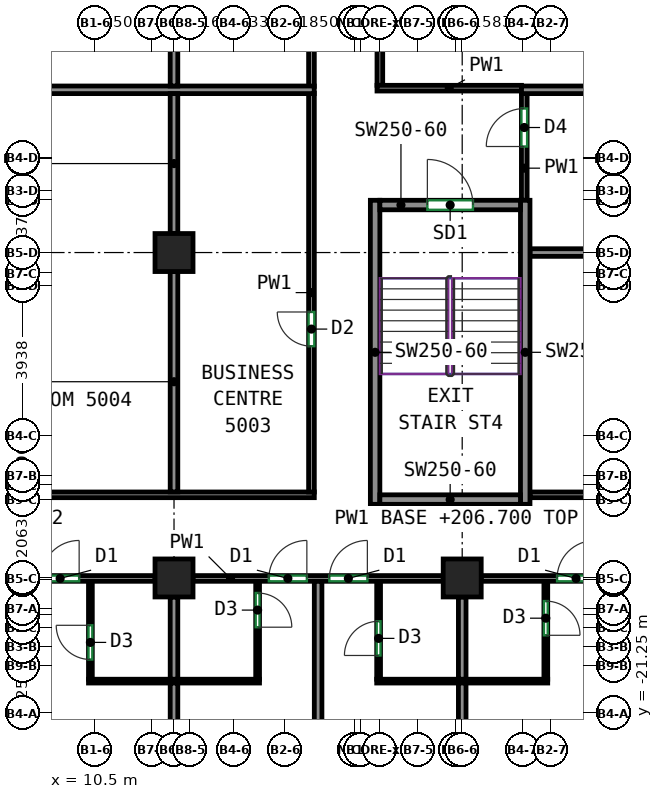
"""IFC4 building model, lengths in metres.
Left out: names, types, materials, properties, quantities, classifications, styles, units other than length and angle.
Written with IfcOpenShell. Run it as: python <this file> out.ifc"""

import sys

from ifc_helpers import new_model, si_unit, direction, frame, frame_2d, origin, origin_2d, place, context, subcontext, project, spatial, rectangle, extrude, source, transform, mapped, element, fill, save


model = new_model("IFC4")
c1 = context("Model", 3, precision=1e-05, world=origin(), true_north=direction((0.0, 1.0)))
c2 = subcontext(c1, "Body", "Model", "MODEL_VIEW")
j1 = project(units=[si_unit("LENGTHUNIT", "METRE"), si_unit("PLANEANGLEUNIT", "RADIAN")], contexts=[c1])
p1 = place(None, origin())
s1 = spatial("IfcSite", under=j1, at=p1, CompositionType="ELEMENT")
p2 = place(p1, origin())
s2 = spatial("IfcBuilding", under=s1, at=p2, CompositionType="ELEMENT")
p3 = place(p2, frame((0.0, 0.0, 206.7)))
s3 = spatial("IfcBuildingStorey", under=s2, at=p3, CompositionType="ELEMENT", Elevation=206.7)
m1 = source(origin(), c2, "Body", "SweptSolid", [
    extrude(rectangle(XDim=1.0, YDim=1.0, at=origin_2d()), origin(), (0.0, 0.0, 1.0), 3.12),
])
for number, where, z_axis, x_axis in (
    (1, (12.583, -17.688, 0.0), (0.0, 0.0, 1.0), (1.0, 0.0, 0.0)),
    (2, (12.583, -9.125, 0.0), (0.0, 0.0, 1.0), (1.0, 0.0, 0.0)),
    (3, (20.167, -17.688, 0.0), (0.0, 0.0, 1.0), (1.0, 0.0, 0.0)),
):
    element("IfcColumn", number, at=place(p3, frame(where, z_axis=z_axis, x_axis=x_axis)), inside=s3, PredefinedType="COLUMN", context=c2, shape_type="MappedRepresentation", body=[
        mapped(m1, transform((0.0, 0.0, 0.0))),
    ])
m2 = source(origin(), c2, "Body", "SweptSolid", [
    extrude(rectangle(XDim=8.0, YDim=0.25, at=frame_2d((4.0, 0.0))), origin(), (0.0, 0.0, 1.0), 3.12),
])
for number, where, z_axis, x_axis in (
    (4, (17.875, -15.75, 0.0), (0.0, 0.0, 1.0), (0.0, 1.0, 0.0)),
    (5, (21.825, -15.75, 0.0), (0.0, 0.0, 1.0), (0.0, 1.0, 0.0)),
):
    element("IfcWall", number, at=place(p3, frame(where, z_axis=z_axis, x_axis=x_axis)), inside=s3, PredefinedType="SHEAR", context=c2, shape_type="MappedRepresentation", body=[
        mapped(m2, transform((0.0, 0.0, 0.0))),
    ])
m3 = source(origin(), c2, "Body", "SweptSolid", [
    extrude(rectangle(XDim=3.7, YDim=0.25, at=frame_2d((1.85, 0.0))), origin(), (0.0, 0.0, 1.0), 3.12),
])
p4 = place(p3, frame((18.0, -15.625, 0.0), z_axis=(0.0, 0.0, 1.0), x_axis=(1.0, 0.0, 0.0)))
e6 = element("IfcWall", 6, at=p4, inside=s3, PredefinedType="SHEAR", context=c2, shape_type="MappedRepresentation", body=[
    mapped(m3, transform((0.0, 0.0, 0.0))),
])
p5 = place(p3, frame((18.0, -7.875, 0.0), z_axis=(0.0, 0.0, 1.0), x_axis=(1.0, 0.0, 0.0)))
e7 = element("IfcWall", 7, at=p5, inside=s3, PredefinedType="SHEAR", context=c2, shape_type="MappedRepresentation", body=[
    mapped(m3, transform((0.0, 0.0, 0.0))),
])
p6 = place(p5, frame((1.25, 0.0, 0.0)))
e8 = element("IfcOpeningElement", 8, at=p6, cuts=e7, PredefinedType="OPENING", context=c2, shape_type="SweptSolid", body=[
    extrude(rectangle(XDim=1.2, YDim=2.1, at=frame_2d((0.6, 1.05))), frame((0.0, 0.135, 0.0), z_axis=(0.0, -1.0, 0.0), x_axis=(1.0, 0.0, 0.0)), (0.0, 0.0, 1.0), 0.27),
])
p7 = place(p3, frame((5.5, -17.7, 0.0), z_axis=(0.0, 0.0, 1.0), x_axis=(1.0, 0.0, 0.0)))
e9 = element("IfcWall", 9, at=p7, inside=s3, PredefinedType="PARTITIONING", context=c2, shape_type="SweptSolid", body=[
    extrude(rectangle(XDim=6.583, YDim=0.15, at=frame_2d((3.292, 0.0))), origin(), (0.0, 0.0, 1.0), 3.12),
])
p8 = place(p7, frame((2.101, 0.0, 0.0)))
e10 = element("IfcOpeningElement", 10, at=p8, cuts=e9, PredefinedType="OPENING", context=c2, shape_type="SweptSolid", body=[
    extrude(rectangle(XDim=1.0, YDim=2.1, at=frame_2d((0.5, 1.05))), frame((0.0, 0.085, 0.0), z_axis=(0.0, -1.0, 0.0), x_axis=(1.0, 0.0, 0.0)), (0.0, 0.0, 1.0), 0.17),
])
p9 = place(p7, frame((3.587, 0.0, 0.0)))
e11 = element("IfcOpeningElement", 11, at=p9, cuts=e9, PredefinedType="OPENING", context=c2, shape_type="SweptSolid", body=[
    extrude(rectangle(XDim=1.0, YDim=2.1, at=frame_2d((0.5, 1.05))), frame((0.0, 0.085, 0.0), z_axis=(0.0, -1.0, 0.0), x_axis=(1.0, 0.0, 0.0)), (0.0, 0.0, 1.0), 0.17),
])
p10 = place(p3, frame((13.083, -17.7, 0.0), z_axis=(0.0, 0.0, 1.0), x_axis=(1.0, 0.0, 0.0)))
e12 = element("IfcWall", 12, at=p10, inside=s3, PredefinedType="PARTITIONING", context=c2, shape_type="SweptSolid", body=[
    extrude(rectangle(XDim=6.584, YDim=0.15, at=frame_2d((3.292, 0.0))), origin(), (0.0, 0.0, 1.0), 3.12),
])
p11 = place(p10, frame((1.996, 0.0, 0.0)))
e13 = element("IfcOpeningElement", 13, at=p11, cuts=e12, PredefinedType="OPENING", context=c2, shape_type="SweptSolid", body=[
    extrude(rectangle(XDim=1.0, YDim=2.1, at=frame_2d((0.5, 1.05))), frame((0.0, 0.085, 0.0), z_axis=(0.0, -1.0, 0.0), x_axis=(1.0, 0.0, 0.0)), (0.0, 0.0, 1.0), 0.17),
])
p12 = place(p10, frame((3.588, 0.0, 0.0)))
e14 = element("IfcOpeningElement", 14, at=p12, cuts=e12, PredefinedType="OPENING", context=c2, shape_type="SweptSolid", body=[
    extrude(rectangle(XDim=1.0, YDim=2.1, at=frame_2d((0.5, 1.05))), frame((0.0, 0.085, 0.0), z_axis=(0.0, -1.0, 0.0), x_axis=(1.0, 0.0, 0.0)), (0.0, 0.0, 1.0), 0.17),
])
p13 = place(p3, frame((20.667, -17.7, 0.0), z_axis=(0.0, 0.0, 1.0), x_axis=(1.0, 0.0, 0.0)))
e15 = element("IfcWall", 15, at=p13, inside=s3, PredefinedType="PARTITIONING", context=c2, shape_type="SweptSolid", body=[
    extrude(rectangle(XDim=7.083, YDim=0.15, at=frame_2d((3.542, 0.0))), origin(), (0.0, 0.0, 1.0), 2.52),
])
p14 = place(p13, frame((1.996, 0.0, 0.0)))
e16 = element("IfcOpeningElement", 16, at=p14, cuts=e15, PredefinedType="OPENING", context=c2, shape_type="SweptSolid", body=[
    extrude(rectangle(XDim=1.0, YDim=2.1, at=frame_2d((0.5, 1.05))), frame((0.0, 0.085, 0.0), z_axis=(0.0, -1.0, 0.0), x_axis=(1.0, 0.0, 0.0)), (0.0, 0.0, 1.0), 0.17),
])
p15 = place(p13, frame((5.782, 0.0, 0.0)))
e17 = element("IfcOpeningElement", 17, at=p15, cuts=e15, PredefinedType="OPENING", context=c2, shape_type="SweptSolid", body=[
    extrude(rectangle(XDim=1.0, YDim=2.1, at=frame_2d((0.5, 1.05))), frame((0.0, 0.085, 0.0), z_axis=(0.0, -1.0, 0.0), x_axis=(1.0, 0.0, 0.0)), (0.0, 0.0, 1.0), 0.17),
])
p16 = place(p3, frame((18.0, -4.725, 0.0), z_axis=(0.0, 0.0, 1.0), x_axis=(0.0, 1.0, 0.0)))
e18 = element("IfcWall", 18, at=p16, inside=s3, PredefinedType="PARTITIONING", context=c2, shape_type="SweptSolid", body=[
    extrude(rectangle(XDim=8.35, YDim=0.15, at=frame_2d((4.175, 0.0))), origin(), (0.0, 0.0, 1.0), 3.12),
])
p17 = place(p16, frame((1.409, 0.0, 0.0)))
e19 = element("IfcOpeningElement", 19, at=p17, cuts=e18, PredefinedType="OPENING", context=c2, shape_type="SweptSolid", body=[
    extrude(rectangle(XDim=0.9, YDim=2.1, at=frame_2d((0.45, 1.05))), frame((0.0, 0.085, 0.0), z_axis=(0.0, -1.0, 0.0), x_axis=(1.0, 0.0, 0.0)), (0.0, 0.0, 1.0), 0.17),
])
p18 = place(p3, frame((17.925, -4.8, 0.0), z_axis=(0.0, 0.0, 1.0), x_axis=(1.0, 0.0, 0.0)))
e20 = element("IfcWall", 20, at=p18, inside=s3, PredefinedType="PARTITIONING", context=c2, shape_type="SweptSolid", body=[
    extrude(rectangle(XDim=3.802, YDim=0.15, at=frame_2d((1.901, 0.0))), origin(), (0.0, 0.0, 1.0), 3.12),
])
p19 = place(p3, frame((21.8, -7.75, 0.0), z_axis=(0.0, 0.0, 1.0), x_axis=(0.0, 1.0, 0.0)))
e21 = element("IfcWall", 21, at=p19, inside=s3, PredefinedType="PARTITIONING", context=c2, shape_type="SweptSolid", body=[
    extrude(rectangle(XDim=2.817, YDim=0.15, at=frame_2d((1.408, 0.0))), origin(), (0.0, 0.0, 1.0), 3.12),
])
p20 = place(p19, frame((1.415, 0.0, 0.0)))
e22 = element("IfcOpeningElement", 22, at=p20, cuts=e21, PredefinedType="OPENING", context=c2, shape_type="SweptSolid", body=[
    extrude(rectangle(XDim=1.0, YDim=2.1, at=frame_2d((0.5, 1.05))), frame((0.0, 0.085, 0.0), z_axis=(0.0, -1.0, 0.0), x_axis=(1.0, 0.0, 0.0)), (0.0, 0.0, 1.0), 0.17),
])
p21 = place(p3, frame((21.95, -15.5, 0.0), z_axis=(0.0, 0.0, 1.0), x_axis=(1.0, 0.0, 0.0)))
e23 = element("IfcWall", 23, at=p21, inside=s3, PredefinedType="PARTITIONING", context=c2, shape_type="SweptSolid", body=[
    extrude(rectangle(XDim=5.875, YDim=0.15, at=frame_2d((2.938, 0.0))), origin(), (0.0, 0.0, 1.0), 3.12),
])
p22 = place(p21, frame((3.962, 0.0, 0.0)))
e24 = element("IfcOpeningElement", 24, at=p22, cuts=e23, PredefinedType="OPENING", context=c2, shape_type="SweptSolid", body=[
    extrude(rectangle(XDim=0.9, YDim=2.1, at=frame_2d((0.45, 1.05))), frame((0.0, 0.085, 0.0), z_axis=(0.0, -1.0, 0.0), x_axis=(1.0, 0.0, 0.0)), (0.0, 0.0, 1.0), 0.17),
])
p23 = place(p3, frame((16.2, -4.753, 0.0), z_axis=(0.0, 0.0, 1.0), x_axis=(0.0, 1.0, 0.0)))
e25 = element("IfcWall", 25, at=p23, inside=s3, PredefinedType="PARTITIONING", context=c2, shape_type="SweptSolid", body=[
    extrude(rectangle(XDim=8.378, YDim=0.15, at=frame_2d((4.189, 0.0))), origin(), (0.0, 0.0, 1.0), 3.12),
])
p24 = place(p23, frame((3.031, 0.0, 0.0)))
e26 = element("IfcOpeningElement", 26, at=p24, cuts=e25, PredefinedType="OPENING", context=c2, shape_type="SweptSolid", body=[
    extrude(rectangle(XDim=0.9, YDim=2.1, at=frame_2d((0.45, 1.05))), frame((0.0, 0.085, 0.0), z_axis=(0.0, -1.0, 0.0), x_axis=(1.0, 0.0, 0.0)), (0.0, 0.0, 1.0), 0.17),
])
p25 = place(p3, frame((-6.385, -15.5, 0.0), z_axis=(0.0, 0.0, 1.0), x_axis=(1.0, 0.0, 0.0)))
e27 = element("IfcWall", 27, at=p25, inside=s3, PredefinedType="PARTITIONING", context=c2, shape_type="SweptSolid", body=[
    extrude(rectangle(XDim=22.66, YDim=0.15, at=frame_2d((11.33, 0.0))), origin(), (0.0, 0.0, 1.0), 3.12),
])
p26 = place(p25, frame((7.266, 0.0, 0.0)))
e28 = element("IfcOpeningElement", 28, at=p26, cuts=e27, PredefinedType="OPENING", context=c2, shape_type="SweptSolid", body=[
    extrude(rectangle(XDim=0.9, YDim=2.1, at=frame_2d((0.45, 1.05))), frame((0.0, 0.085, 0.0), z_axis=(0.0, -1.0, 0.0), x_axis=(1.0, 0.0, 0.0)), (0.0, 0.0, 1.0), 0.17),
])
p27 = place(p25, frame((14.576, 0.0, 0.0)))
e29 = element("IfcOpeningElement", 29, at=p27, cuts=e27, PredefinedType="OPENING", context=c2, shape_type="SweptSolid", body=[
    extrude(rectangle(XDim=0.9, YDim=2.1, at=frame_2d((0.45, 1.05))), frame((0.0, 0.085, 0.0), z_axis=(0.0, -1.0, 0.0), x_axis=(1.0, 0.0, 0.0)), (0.0, 0.0, 1.0), 0.17),
])
p28 = place(p3, frame((16.2, -15.425, 0.0), z_axis=(0.0, 0.0, 1.0), x_axis=(0.0, 1.0, 0.0)))
e30 = element("IfcWall", 30, at=p28, inside=s3, PredefinedType="PARTITIONING", context=c2, shape_type="SweptSolid", body=[
    extrude(rectangle(XDim=10.492, YDim=0.15, at=frame_2d((5.246, 0.0))), origin(), (0.0, 0.0, 1.0), 3.12),
])
p29 = place(p28, frame((3.836, 0.0, 0.0)))
e31 = element("IfcOpeningElement", 31, at=p29, cuts=e30, PredefinedType="OPENING", context=c2, shape_type="SweptSolid", body=[
    extrude(rectangle(XDim=0.9, YDim=2.1, at=frame_2d((0.45, 1.05))), frame((0.0, 0.085, 0.0), z_axis=(0.0, -1.0, 0.0), x_axis=(1.0, 0.0, 0.0)), (0.0, 0.0, 1.0), 0.17),
])
p30 = place(p3, frame((10.383, -20.352, 0.0), z_axis=(0.0, 0.0, 1.0), x_axis=(0.0, 1.0, 0.0)))
e32 = element("IfcWall", 32, at=p30, inside=s3, PredefinedType="PARTITIONING", context=c2, shape_type="SweptSolid", body=[
    extrude(rectangle(XDim=2.575, YDim=0.1, at=frame_2d((1.288, 0.0))), origin(), (0.0, 0.0, 1.0), 3.12),
])
p31 = place(p30, frame((0.519, 0.0, 0.0)))
e33 = element("IfcOpeningElement", 33, at=p31, cuts=e32, PredefinedType="OPENING", context=c2, shape_type="SweptSolid", body=[
    extrude(rectangle(XDim=0.9, YDim=2.1, at=frame_2d((0.45, 1.05))), frame((0.0, 0.06, 0.0), z_axis=(0.0, -1.0, 0.0), x_axis=(1.0, 0.0, 0.0)), (0.0, 0.0, 1.0), 0.12),
])
p32 = place(p3, frame((10.333, -20.402, 0.0), z_axis=(0.0, 0.0, 1.0), x_axis=(1.0, 0.0, 0.0)))
e34 = element("IfcWall", 34, at=p32, inside=s3, PredefinedType="PARTITIONING", context=c2, shape_type="SweptSolid", body=[
    extrude(rectangle(XDim=4.5, YDim=0.1, at=frame_2d((2.25, 0.0))), origin(), (0.0, 0.0, 1.0), 3.12),
])
p33 = place(p3, frame((12.583, -25.425, 0.0), z_axis=(0.0, 0.0, 1.0), x_axis=(0.0, 1.0, 0.0)))
e35 = element("IfcWall", 35, at=p33, inside=s3, PredefinedType="PARTITIONING", context=c2, shape_type="SweptSolid", body=[
    extrude(rectangle(XDim=4.973, YDim=0.2, at=frame_2d((2.487, 0.0))), origin(), (0.0, 0.0, 1.0), 3.12),
])
p34 = place(p3, frame((12.583, -20.352, 0.0), z_axis=(0.0, 0.0, 1.0), x_axis=(0.0, 1.0, 0.0)))
e36 = element("IfcWall", 36, at=p34, inside=s3, PredefinedType="PARTITIONING", context=c2, shape_type="SweptSolid", body=[
    extrude(rectangle(XDim=2.164, YDim=0.2, at=frame_2d((1.082, 0.0))), origin(), (0.0, 0.0, 1.0), 3.12),
])
p35 = place(p3, frame((14.783, -17.777, 0.0), z_axis=(0.0, 0.0, 1.0), x_axis=(0.0, -1.0, 0.0)))
e37 = element("IfcWall", 37, at=p35, inside=s3, PredefinedType="PARTITIONING", context=c2, shape_type="SweptSolid", body=[
    extrude(rectangle(XDim=2.575, YDim=0.1, at=frame_2d((1.288, 0.0))), origin(), (0.0, 0.0, 1.0), 3.12),
])
p36 = place(p35, frame((0.306, 0.0, 0.0)))
e38 = element("IfcOpeningElement", 38, at=p36, cuts=e37, PredefinedType="OPENING", context=c2, shape_type="SweptSolid", body=[
    extrude(rectangle(XDim=0.9, YDim=2.1, at=frame_2d((0.45, 1.05))), frame((0.0, 0.06, 0.0), z_axis=(0.0, -1.0, 0.0), x_axis=(1.0, 0.0, 0.0)), (0.0, 0.0, 1.0), 0.12),
])
p37 = place(p3, frame((16.375, -26.0, 0.0), z_axis=(0.0, 0.0, 1.0), x_axis=(0.0, 1.0, 0.0)))
e39 = element("IfcWall", 39, at=p37, inside=s3, PredefinedType="PARTITIONING", context=c2, shape_type="SweptSolid", body=[
    extrude(rectangle(XDim=8.223, YDim=0.2, at=frame_2d((4.111, 0.0))), origin(), (0.0, 0.0, 1.0), 3.12),
])
p38 = place(p3, frame((17.967, -20.352, 0.0), z_axis=(0.0, 0.0, 1.0), x_axis=(0.0, 1.0, 0.0)))
e40 = element("IfcWall", 40, at=p38, inside=s3, PredefinedType="PARTITIONING", context=c2, shape_type="SweptSolid", body=[
    extrude(rectangle(XDim=2.575, YDim=0.1, at=frame_2d((1.288, 0.0))), origin(), (0.0, 0.0, 1.0), 3.12),
])
p39 = place(p38, frame((0.625, 0.0, 0.0)))
e41 = element("IfcOpeningElement", 41, at=p39, cuts=e40, PredefinedType="OPENING", context=c2, shape_type="SweptSolid", body=[
    extrude(rectangle(XDim=0.9, YDim=2.1, at=frame_2d((0.45, 1.05))), frame((0.0, 0.06, 0.0), z_axis=(0.0, -1.0, 0.0), x_axis=(1.0, 0.0, 0.0)), (0.0, 0.0, 1.0), 0.12),
])
p40 = place(p3, frame((17.917, -20.402, 0.0), z_axis=(0.0, 0.0, 1.0), x_axis=(1.0, 0.0, 0.0)))
e42 = element("IfcWall", 42, at=p40, inside=s3, PredefinedType="PARTITIONING", context=c2, shape_type="SweptSolid", body=[
    extrude(rectangle(XDim=4.5, YDim=0.1, at=frame_2d((2.25, 0.0))), origin(), (0.0, 0.0, 1.0), 3.12),
])
p41 = place(p3, frame((20.167, -25.425, 0.0), z_axis=(0.0, 0.0, 1.0), x_axis=(0.0, 1.0, 0.0)))
e43 = element("IfcWall", 43, at=p41, inside=s3, PredefinedType="PARTITIONING", context=c2, shape_type="SweptSolid", body=[
    extrude(rectangle(XDim=4.973, YDim=0.2, at=frame_2d((2.487, 0.0))), origin(), (0.0, 0.0, 1.0), 3.12),
])
p42 = place(p3, frame((20.167, -20.352, 0.0), z_axis=(0.0, 0.0, 1.0), x_axis=(0.0, 1.0, 0.0)))
e44 = element("IfcWall", 44, at=p42, inside=s3, PredefinedType="PARTITIONING", context=c2, shape_type="SweptSolid", body=[
    extrude(rectangle(XDim=2.164, YDim=0.2, at=frame_2d((1.082, 0.0))), origin(), (0.0, 0.0, 1.0), 3.12),
])
p43 = place(p3, frame((22.367, -17.777, 0.0), z_axis=(0.0, 0.0, 1.0), x_axis=(0.0, -1.0, 0.0)))
e45 = element("IfcWall", 45, at=p43, inside=s3, PredefinedType="PARTITIONING", context=c2, shape_type="SweptSolid", body=[
    extrude(rectangle(XDim=2.575, YDim=0.1, at=frame_2d((1.288, 0.0))), origin(), (0.0, 0.0, 1.0), 3.12),
])
p44 = place(p43, frame((0.519, 0.0, 0.0)))
e46 = element("IfcOpeningElement", 46, at=p44, cuts=e45, PredefinedType="OPENING", context=c2, shape_type="SweptSolid", body=[
    extrude(rectangle(XDim=0.9, YDim=2.1, at=frame_2d((0.45, 1.05))), frame((0.0, 0.06, 0.0), z_axis=(0.0, -1.0, 0.0), x_axis=(1.0, 0.0, 0.0)), (0.0, 0.0, 1.0), 0.12),
])
p45 = place(p3, frame((21.727, -4.843, 0.0), z_axis=(0.0, 0.0, 1.0), x_axis=(1.0, 0.0, 0.0)))
e47 = element("IfcWall", 47, at=p45, inside=s3, PredefinedType="PARTITIONING", context=c2, shape_type="SweptSolid", body=[
    extrude(rectangle(XDim=9.273, YDim=0.2, at=frame_2d((4.636, 0.0))), origin(), (0.0, 0.0, 1.0), 3.12),
])
p46 = place(p3, frame((21.95, -9.125, 0.0), z_axis=(0.0, 0.0, 1.0), x_axis=(1.0, 0.0, 0.0)))
e48 = element("IfcWall", 48, at=p46, inside=s3, PredefinedType="PARTITIONING", context=c2, shape_type="SweptSolid", body=[
    extrude(rectangle(XDim=8.475, YDim=0.2, at=frame_2d((4.238, 0.0))), origin(), (0.0, 0.0, 1.0), 3.12),
])
p47 = place(p3, frame((-13.873, -4.843, 0.0), z_axis=(0.0, 0.0, 1.0), x_axis=(1.0, 0.0, 0.0)))
e49 = element("IfcWall", 49, at=p47, inside=s3, PredefinedType="PARTITIONING", context=c2, shape_type="SweptSolid", body=[
    extrude(rectangle(XDim=30.146, YDim=0.2, at=frame_2d((15.073, 0.0))), origin(), (0.0, 0.0, 1.0), 3.12),
])
p48 = place(p3, frame((12.583, -4.743, 0.0), z_axis=(0.0, 0.0, 1.0), x_axis=(0.0, 1.0, 0.0)))
e50 = element("IfcWall", 50, at=p48, inside=s3, PredefinedType="PARTITIONING", context=c2, shape_type="SweptSolid", body=[
    extrude(rectangle(XDim=3.681, YDim=0.2, at=frame_2d((1.84, 0.0))), origin(), (0.0, 0.0, 1.0), 2.52),
])
p49 = place(p3, frame((12.583, -8.625, 0.0), z_axis=(0.0, 0.0, 1.0), x_axis=(0.0, 1.0, 0.0)))
e51 = element("IfcWall", 51, at=p49, inside=s3, PredefinedType="PARTITIONING", context=c2, shape_type="SweptSolid", body=[
    extrude(rectangle(XDim=3.682, YDim=0.2, at=frame_2d((1.841, 0.0))), origin(), (0.0, 0.0, 1.0), 2.52),
])
p50 = place(p3, frame((12.583, -15.423, 0.0), z_axis=(0.0, 0.0, 1.0), x_axis=(0.0, 1.0, 0.0)))
e52 = element("IfcWall", 52, at=p50, inside=s3, PredefinedType="PARTITIONING", context=c2, shape_type="SweptSolid", body=[
    extrude(rectangle(XDim=5.798, YDim=0.2, at=frame_2d((2.899, 0.0))), origin(), (0.0, 0.0, 1.0), 2.52),
])
p51 = place(p6, origin())
e53 = element("IfcDoor", 53, at=p51, inside=s3, OperationType="DOUBLE_DOOR_SINGLE_SWING", PredefinedType="DOOR", context=c2, shape_type="SweptSolid", body=[
    extrude(rectangle(XDim=1.2, YDim=2.1, at=frame_2d((0.6, 1.05))), frame((0.0, 0.025, 0.0), z_axis=(0.0, -1.0, 0.0), x_axis=(1.0, 0.0, 0.0)), (0.0, 0.0, 1.0), 0.05),
])
fill(e8, e53)
p52 = place(p31, origin())
e54 = element("IfcDoor", 54, at=p52, inside=s3, OperationType="SINGLE_SWING_RIGHT", PredefinedType="DOOR", context=c2, shape_type="SweptSolid", body=[
    extrude(rectangle(XDim=0.9, YDim=2.1, at=frame_2d((0.45, 1.05))), frame((0.0, 0.025, 0.0), z_axis=(0.0, -1.0, 0.0), x_axis=(1.0, 0.0, 0.0)), (0.0, 0.0, 1.0), 0.05),
])
fill(e33, e54)
p53 = place(p39, origin())
e55 = element("IfcDoor", 55, at=p53, inside=s3, OperationType="SINGLE_SWING_LEFT", PredefinedType="DOOR", context=c2, shape_type="SweptSolid", body=[
    extrude(rectangle(XDim=0.9, YDim=2.1, at=frame_2d((0.45, 1.05))), frame((0.0, 0.025, 0.0), z_axis=(0.0, -1.0, 0.0), x_axis=(1.0, 0.0, 0.0)), (0.0, 0.0, 1.0), 0.05),
])
fill(e41, e55)
p54 = place(p44, origin())
e56 = element("IfcDoor", 56, at=p54, inside=s3, OperationType="SINGLE_SWING_RIGHT", PredefinedType="DOOR", context=c2, shape_type="SweptSolid", body=[
    extrude(rectangle(XDim=0.9, YDim=2.1, at=frame_2d((0.45, 1.05))), frame((0.0, 0.025, 0.0), z_axis=(0.0, -1.0, 0.0), x_axis=(1.0, 0.0, 0.0)), (0.0, 0.0, 1.0), 0.05),
])
fill(e46, e56)
p55 = place(p36, origin())
e57 = element("IfcDoor", 57, at=p55, inside=s3, OperationType="SINGLE_SWING_RIGHT", PredefinedType="DOOR", context=c2, shape_type="SweptSolid", body=[
    extrude(rectangle(XDim=0.9, YDim=2.1, at=frame_2d((0.45, 1.05))), frame((0.0, 0.025, 0.0), z_axis=(0.0, -1.0, 0.0), x_axis=(1.0, 0.0, 0.0)), (0.0, 0.0, 1.0), 0.05),
])
fill(e38, e57)
p56 = place(p9, origin())
e58 = element("IfcDoor", 58, at=p56, inside=s3, OperationType="SINGLE_SWING_RIGHT", PredefinedType="DOOR", context=c2, shape_type="SweptSolid", body=[
    extrude(rectangle(XDim=1.0, YDim=2.1, at=frame_2d((0.5, 1.05))), frame((0.0, 0.025, 0.0), z_axis=(0.0, -1.0, 0.0), x_axis=(1.0, 0.0, 0.0)), (0.0, 0.0, 1.0), 0.05),
])
fill(e11, e58)
p57 = place(p11, origin())
e59 = element("IfcDoor", 59, at=p57, inside=s3, OperationType="SINGLE_SWING_RIGHT", PredefinedType="DOOR", context=c2, shape_type="SweptSolid", body=[
    extrude(rectangle(XDim=1.0, YDim=2.1, at=frame_2d((0.5, 1.05))), frame((0.0, 0.025, 0.0), z_axis=(0.0, -1.0, 0.0), x_axis=(1.0, 0.0, 0.0)), (0.0, 0.0, 1.0), 0.05),
])
fill(e13, e59)
p58 = place(p12, origin())
e60 = element("IfcDoor", 60, at=p58, inside=s3, OperationType="SINGLE_SWING_RIGHT", PredefinedType="DOOR", context=c2, shape_type="SweptSolid", body=[
    extrude(rectangle(XDim=1.0, YDim=2.1, at=frame_2d((0.5, 1.05))), frame((0.0, 0.025, 0.0), z_axis=(0.0, -1.0, 0.0), x_axis=(1.0, 0.0, 0.0)), (0.0, 0.0, 1.0), 0.05),
])
fill(e14, e60)
p59 = place(p14, origin())
e61 = element("IfcDoor", 61, at=p59, inside=s3, OperationType="SINGLE_SWING_RIGHT", PredefinedType="DOOR", context=c2, shape_type="SweptSolid", body=[
    extrude(rectangle(XDim=1.0, YDim=2.1, at=frame_2d((0.5, 1.05))), frame((0.0, 0.025, 0.0), z_axis=(0.0, -1.0, 0.0), x_axis=(1.0, 0.0, 0.0)), (0.0, 0.0, 1.0), 0.05),
])
fill(e16, e61)
p60 = place(p29, origin())
e62 = element("IfcDoor", 62, at=p60, inside=s3, OperationType="SINGLE_SWING_RIGHT", PredefinedType="DOOR", context=c2, shape_type="SweptSolid", body=[
    extrude(rectangle(XDim=0.9, YDim=2.1, at=frame_2d((0.45, 1.05))), frame((0.0, 0.025, 0.0), z_axis=(0.0, -1.0, 0.0), x_axis=(1.0, 0.0, 0.0)), (0.0, 0.0, 1.0), 0.05),
])
fill(e31, e62)
p61 = place(p20, origin())
e63 = element("IfcDoor", 63, at=p61, inside=s3, OperationType="SINGLE_SWING_LEFT", PredefinedType="DOOR", context=c2, shape_type="SweptSolid", body=[
    extrude(rectangle(XDim=1.0, YDim=2.1, at=frame_2d((0.5, 1.05))), frame((0.0, 0.025, 0.0), z_axis=(0.0, -1.0, 0.0), x_axis=(1.0, 0.0, 0.0)), (0.0, 0.0, 1.0), 0.05),
])
fill(e22, e63)
save(model, sys.argv[1])
